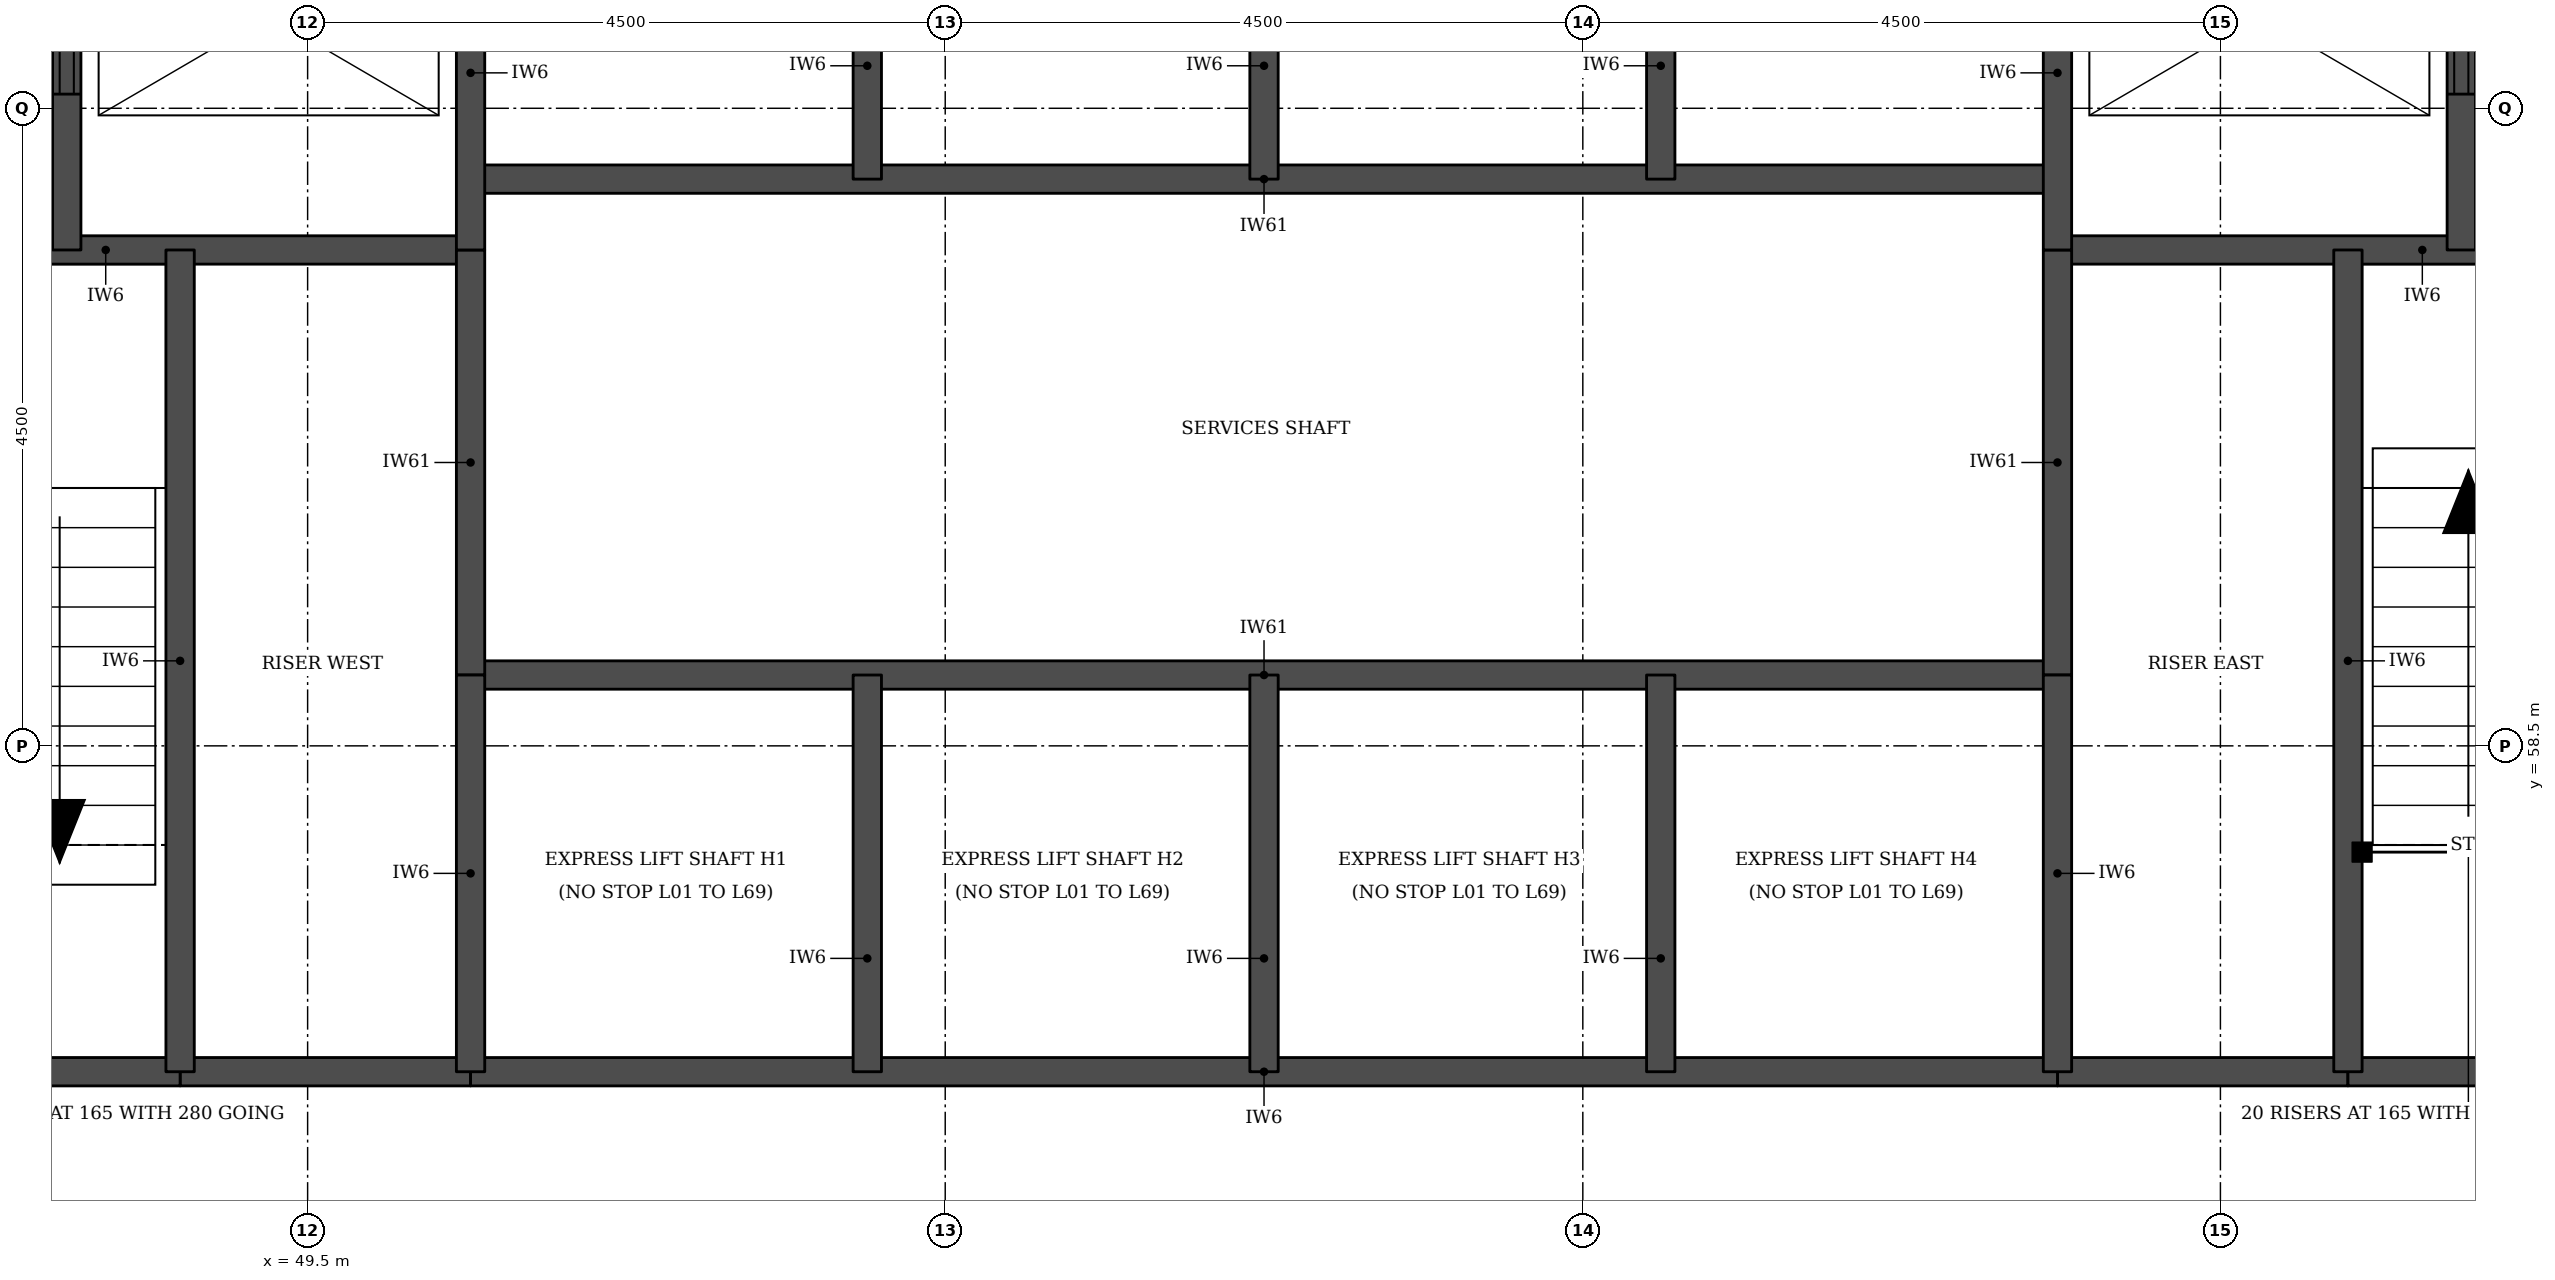
"""IFC4 building model, lengths in metres.
Left out: names, types, materials, properties, quantities, classifications, styles, units other than length and angle.
Written with IfcOpenShell. Run it as: python <this file> out.ifc"""

import sys

from ifc_helpers import new_model, si_unit, direction, frame, frame_2d, origin, place, context, subcontext, project, spatial, rectangle, extrude, element, fill, save


model = new_model("IFC4")
c1 = context("Model", 3, precision=1e-05, world=origin(), true_north=direction((0.0, 1.0)))
c2 = subcontext(c1, "Body", "Model", "MODEL_VIEW")
j1 = project(units=[si_unit("LENGTHUNIT", "METRE"), si_unit("PLANEANGLEUNIT", "RADIAN")], contexts=[c1])
p1 = place(None, origin())
s1 = spatial("IfcSite", under=j1, at=p1, CompositionType="ELEMENT")
p2 = place(p1, origin())
s2 = spatial("IfcBuilding", under=s1, at=p2, CompositionType="ELEMENT")
p3 = place(p2, frame((0.0, 0.0, 52.8)))
s3 = spatial("IfcBuildingStorey", under=s2, at=p3, CompositionType="ELEMENT", Elevation=52.8)
for number, where, z_axis, x_axis in (
    (1, (48.6, 56.2, 0.0), (0.0, 0.0, 1.0), (1.0, 0.0, 0.0)),
    (2, (61.85, 56.2, 0.0), (0.0, 0.0, 1.0), (1.0, 0.0, 0.0)),
):
    element("IfcWall", number, at=place(p3, frame(where, z_axis=z_axis, x_axis=x_axis)), inside=s3, PredefinedType="SOLIDWALL", context=c2, shape_type="SweptSolid", body=[
        extrude(rectangle(XDim=2.05, YDim=0.2, at=frame_2d((1.025, 0.0))), origin(), (0.0, 0.0, 1.0), 3.08),
    ])
p4 = place(p3, frame((45.5, 56.2, 0.0), z_axis=(0.0, 0.0, 1.0), x_axis=(1.0, 0.0, 0.0)))
e3 = element("IfcWall", 3, at=p4, inside=s3, PredefinedType="SOLIDWALL", context=c2, shape_type="SweptSolid", body=[
    extrude(rectangle(XDim=3.1, YDim=0.2, at=frame_2d((1.55, 0.0))), origin(), (0.0, 0.0, 1.0), 3.08),
])
p5 = place(p3, frame((50.65, 56.2, 0.0), z_axis=(0.0, 0.0, 1.0), x_axis=(1.0, 0.0, 0.0)))
e4 = element("IfcWall", 4, at=p5, inside=s3, PredefinedType="SOLIDWALL", context=c2, shape_type="SweptSolid", body=[
    extrude(rectangle(XDim=11.2, YDim=0.2, at=frame_2d((5.6, 0.0))), origin(), (0.0, 0.0, 1.0), 3.08),
])
p6 = place(p3, frame((63.9, 56.2, 0.0), z_axis=(0.0, 0.0, 1.0), x_axis=(1.0, 0.0, 0.0)))
e5 = element("IfcWall", 5, at=p6, inside=s3, PredefinedType="SOLIDWALL", context=c2, shape_type="SweptSolid", body=[
    extrude(rectangle(XDim=3.1, YDim=0.2, at=frame_2d((1.55, 0.0))), origin(), (0.0, 0.0, 1.0), 3.08),
])
p7 = place(p3, frame((50.65, 59.0, 0.0), z_axis=(0.0, 0.0, 1.0), x_axis=(1.0, 0.0, 0.0)))
e6 = element("IfcWall", 6, at=p7, inside=s3, PredefinedType="SOLIDWALL", context=c2, shape_type="SweptSolid", body=[
    extrude(rectangle(XDim=11.2, YDim=0.2, at=frame_2d((5.6, 0.0))), origin(), (0.0, 0.0, 1.0), 3.3),
])
for number, where, z_axis, x_axis in (
    (7, (45.5, 62.0, 0.0), (0.0, 0.0, 1.0), (1.0, 0.0, 0.0)),
    (8, (61.85, 62.0, 0.0), (0.0, 0.0, 1.0), (1.0, 0.0, 0.0)),
):
    element("IfcWall", number, at=place(p3, frame(where, z_axis=z_axis, x_axis=x_axis)), inside=s3, PredefinedType="SOLIDWALL", context=c2, shape_type="SweptSolid", body=[
        extrude(rectangle(XDim=5.15, YDim=0.2, at=frame_2d((2.575, 0.0))), origin(), (0.0, 0.0, 1.0), 3.08),
    ])
p8 = place(p3, frame((50.65, 62.5, 0.0), z_axis=(0.0, 0.0, 1.0), x_axis=(1.0, 0.0, 0.0)))
e9 = element("IfcWall", 9, at=p8, inside=s3, PredefinedType="SOLIDWALL", context=c2, shape_type="SweptSolid", body=[
    extrude(rectangle(XDim=11.2, YDim=0.2, at=frame_2d((5.6, 0.0))), origin(), (0.0, 0.0, 1.0), 3.3),
])
p9 = place(p3, frame((47.8, 62.0, 0.0), z_axis=(0.0, 0.0, 1.0), x_axis=(0.0, 1.0, 0.0)))
e10 = element("IfcWall", 10, at=p9, inside=s3, PredefinedType="SOLIDWALL", context=c2, shape_type="SweptSolid", body=[
    extrude(rectangle(XDim=3.3, YDim=0.2, at=frame_2d((1.65, 0.0))), origin(), (0.0, 0.0, 1.0), 3.08),
])
p10 = place(p9, frame((1.1, 0.0, 0.0)))
e11 = element("IfcOpeningElement", 11, at=p10, cuts=e10, PredefinedType="OPENING", context=c2, shape_type="SweptSolid", body=[
    extrude(rectangle(XDim=1.1, YDim=2.1, at=frame_2d((0.55, 1.05))), frame((0.0, 0.11, 0.0), z_axis=(0.0, -1.0, 0.0), x_axis=(1.0, 0.0, 0.0)), (0.0, 0.0, 1.0), 0.22),
])
p11 = place(p3, frame((48.6, 56.2, 0.0), z_axis=(0.0, 0.0, 1.0), x_axis=(0.0, 1.0, 0.0)))
e12 = element("IfcWall", 12, at=p11, inside=s3, PredefinedType="SOLIDWALL", context=c2, shape_type="SweptSolid", body=[
    extrude(rectangle(XDim=5.8, YDim=0.2, at=frame_2d((2.9, 0.0))), origin(), (0.0, 0.0, 1.0), 3.08),
])
p12 = place(p3, frame((50.65, 59.0, 0.0), z_axis=(0.0, 0.0, 1.0), x_axis=(0.0, 1.0, 0.0)))
e13 = element("IfcWall", 13, at=p12, inside=s3, PredefinedType="SOLIDWALL", context=c2, shape_type="SweptSolid", body=[
    extrude(rectangle(XDim=3.0, YDim=0.2, at=frame_2d((1.5, 0.0))), origin(), (0.0, 0.0, 1.0), 3.3),
])
p13 = place(p3, frame((50.65, 56.2, 0.0), z_axis=(0.0, 0.0, 1.0), x_axis=(0.0, 1.0, 0.0)))
e14 = element("IfcWall", 14, at=p13, inside=s3, PredefinedType="SOLIDWALL", context=c2, shape_type="SweptSolid", body=[
    extrude(rectangle(XDim=2.8, YDim=0.2, at=frame_2d((1.4, 0.0))), origin(), (0.0, 0.0, 1.0), 3.08),
])
p14 = place(p3, frame((50.65, 62.0, 0.0), z_axis=(0.0, 0.0, 1.0), x_axis=(0.0, 1.0, 0.0)))
e15 = element("IfcWall", 15, at=p14, inside=s3, PredefinedType="SOLIDWALL", context=c2, shape_type="SweptSolid", body=[
    extrude(rectangle(XDim=3.3, YDim=0.2, at=frame_2d((1.65, 0.0))), origin(), (0.0, 0.0, 1.0), 3.08),
])
for number, where, z_axis, x_axis in (
    (16, (53.45, 56.2, 0.0), (0.0, 0.0, 1.0), (0.0, 1.0, 0.0)),
    (17, (53.45, 62.5, 0.0), (0.0, 0.0, 1.0), (0.0, 1.0, 0.0)),
    (18, (56.25, 56.2, 0.0), (0.0, 0.0, 1.0), (0.0, 1.0, 0.0)),
    (19, (56.25, 62.5, 0.0), (0.0, 0.0, 1.0), (0.0, 1.0, 0.0)),
    (20, (59.05, 56.2, 0.0), (0.0, 0.0, 1.0), (0.0, 1.0, 0.0)),
    (21, (59.05, 62.5, 0.0), (0.0, 0.0, 1.0), (0.0, 1.0, 0.0)),
):
    element("IfcWall", number, at=place(p3, frame(where, z_axis=z_axis, x_axis=x_axis)), inside=s3, PredefinedType="SOLIDWALL", context=c2, shape_type="SweptSolid", body=[
        extrude(rectangle(XDim=2.8, YDim=0.2, at=frame_2d((1.4, 0.0))), origin(), (0.0, 0.0, 1.0), 3.08),
    ])
p15 = place(p3, frame((61.85, 59.0, 0.0), z_axis=(0.0, 0.0, 1.0), x_axis=(0.0, 1.0, 0.0)))
e22 = element("IfcWall", 22, at=p15, inside=s3, PredefinedType="SOLIDWALL", context=c2, shape_type="SweptSolid", body=[
    extrude(rectangle(XDim=3.0, YDim=0.2, at=frame_2d((1.5, 0.0))), origin(), (0.0, 0.0, 1.0), 3.3),
])
p16 = place(p3, frame((61.85, 56.2, 0.0), z_axis=(0.0, 0.0, 1.0), x_axis=(0.0, 1.0, 0.0)))
e23 = element("IfcWall", 23, at=p16, inside=s3, PredefinedType="SOLIDWALL", context=c2, shape_type="SweptSolid", body=[
    extrude(rectangle(XDim=2.8, YDim=0.2, at=frame_2d((1.4, 0.0))), origin(), (0.0, 0.0, 1.0), 3.08),
])
p17 = place(p3, frame((61.85, 62.0, 0.0), z_axis=(0.0, 0.0, 1.0), x_axis=(0.0, 1.0, 0.0)))
e24 = element("IfcWall", 24, at=p17, inside=s3, PredefinedType="SOLIDWALL", context=c2, shape_type="SweptSolid", body=[
    extrude(rectangle(XDim=3.3, YDim=0.2, at=frame_2d((1.65, 0.0))), origin(), (0.0, 0.0, 1.0), 3.08),
])
p18 = place(p3, frame((63.9, 56.2, 0.0), z_axis=(0.0, 0.0, 1.0), x_axis=(0.0, 1.0, 0.0)))
e25 = element("IfcWall", 25, at=p18, inside=s3, PredefinedType="SOLIDWALL", context=c2, shape_type="SweptSolid", body=[
    extrude(rectangle(XDim=5.8, YDim=0.2, at=frame_2d((2.9, 0.0))), origin(), (0.0, 0.0, 1.0), 3.08),
])
p19 = place(p3, frame((64.7, 62.0, 0.0), z_axis=(0.0, 0.0, 1.0), x_axis=(0.0, 1.0, 0.0)))
e26 = element("IfcWall", 26, at=p19, inside=s3, PredefinedType="SOLIDWALL", context=c2, shape_type="SweptSolid", body=[
    extrude(rectangle(XDim=3.3, YDim=0.2, at=frame_2d((1.65, 0.0))), origin(), (0.0, 0.0, 1.0), 3.08),
])
p20 = place(p19, frame((1.1, 0.0, 0.0)))
e27 = element("IfcOpeningElement", 27, at=p20, cuts=e26, PredefinedType="OPENING", context=c2, shape_type="SweptSolid", body=[
    extrude(rectangle(XDim=1.1, YDim=2.1, at=frame_2d((0.55, 1.05))), frame((0.0, 0.11, 0.0), z_axis=(0.0, -1.0, 0.0), x_axis=(1.0, 0.0, 0.0)), (0.0, 0.0, 1.0), 0.22),
])
p21 = place(p10, origin())
e28 = element("IfcDoor", 28, at=p21, inside=s3, OperationType="DOUBLE_DOOR_SLIDING", PredefinedType="DOOR", context=c2, shape_type="SweptSolid", body=[
    extrude(rectangle(XDim=1.1, YDim=2.1, at=frame_2d((0.55, 1.05))), frame((0.0, 0.025, 0.0), z_axis=(0.0, -1.0, 0.0), x_axis=(1.0, 0.0, 0.0)), (0.0, 0.0, 1.0), 0.05),
])
fill(e11, e28)
p22 = place(p20, origin())
e29 = element("IfcDoor", 29, at=p22, inside=s3, OperationType="DOUBLE_DOOR_SLIDING", PredefinedType="DOOR", context=c2, shape_type="SweptSolid", body=[
    extrude(rectangle(XDim=1.1, YDim=2.1, at=frame_2d((0.55, 1.05))), frame((0.0, 0.025, 0.0), z_axis=(0.0, -1.0, 0.0), x_axis=(1.0, 0.0, 0.0)), (0.0, 0.0, 1.0), 0.05),
])
fill(e27, e29)
save(model, sys.argv[1])
